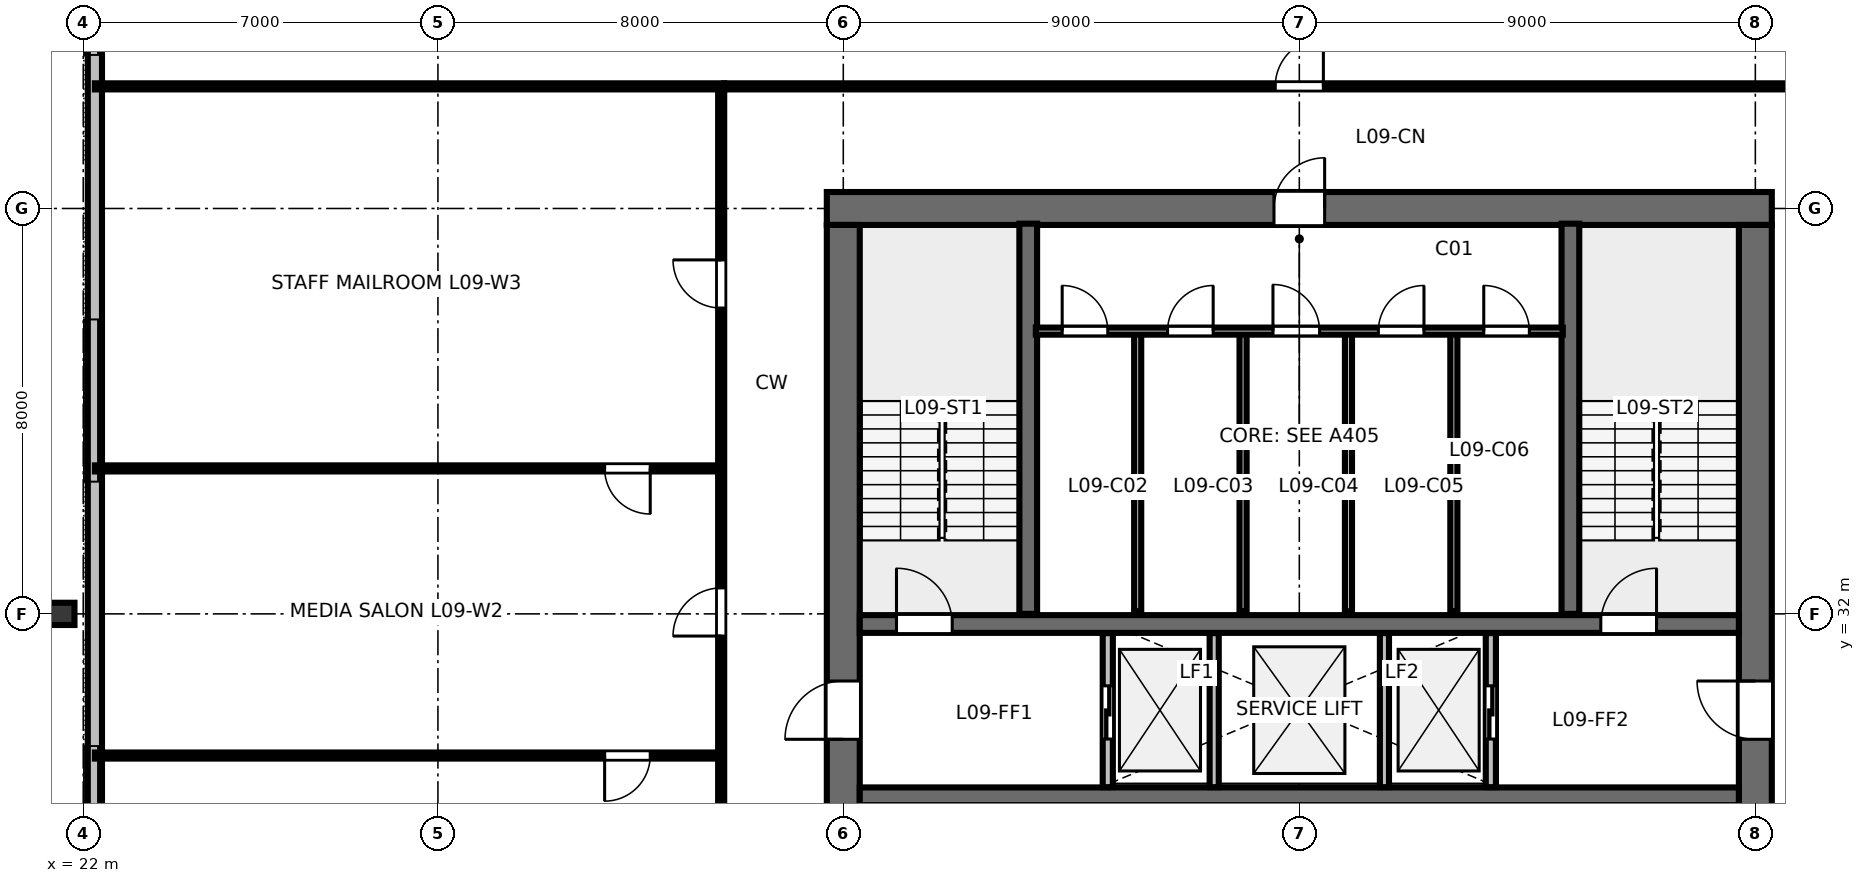
"""IFC4 building model, lengths in metres.
Left out: names, types, materials, properties, quantities, classifications, styles, units other than length and angle.
Written with IfcOpenShell. Run it as: python <this file> out.ifc"""

import sys

from ifc_helpers import new_model, si_unit, direction, frame, frame_2d, origin, origin_2d, place, context, subcontext, project, spatial, rectangle, i_section, extrude, element, fill, save


model = new_model("IFC4")
c1 = context("Model", 3, precision=1e-05, world=origin(), true_north=direction((0.0, 1.0)))
c2 = subcontext(c1, "Body", "Model", "MODEL_VIEW")
j1 = project(units=[si_unit("LENGTHUNIT", "METRE"), si_unit("PLANEANGLEUNIT", "RADIAN")], contexts=[c1])
p1 = place(None, origin())
s1 = spatial("IfcSite", under=j1, at=p1, CompositionType="ELEMENT")
p2 = place(p1, origin())
s2 = spatial("IfcBuilding", under=s1, at=p2, CompositionType="ELEMENT")
p3 = place(p2, frame((0.0, 0.0, 38.8)))
s3 = spatial("IfcBuildingStorey", under=s2, at=p3, CompositionType="ELEMENT", Elevation=38.8)
p4 = place(p3, frame((36.675, 40.0, 0.0), z_axis=(0.0, 0.0, 1.0), x_axis=(1.0, 0.0, 0.0)))
e1 = element("IfcWall", 1, at=p4, inside=s3, PredefinedType="SHEAR", context=c2, shape_type="SweptSolid", body=[
    extrude(rectangle(XDim=18.65, YDim=0.65, at=frame_2d((9.325, 0.0))), origin(), (0.0, 0.0, 1.0), 3.36),
])
p5 = place(p4, frame((8.825, 0.0, 0.0)))
e2 = element("IfcOpeningElement", 2, at=p5, cuts=e1, PredefinedType="OPENING", context=c2, shape_type="SweptSolid", body=[
    extrude(rectangle(XDim=1.0, YDim=2.15, at=frame_2d((0.5, 1.075))), frame((0.0, 0.335, 0.0), z_axis=(0.0, -1.0, 0.0), x_axis=(1.0, 0.0, 0.0)), (0.0, 0.0, 1.0), 0.67),
])
p6 = place(p3, frame((37.0, 24.325, 0.0), z_axis=(0.0, 0.0, 1.0), x_axis=(0.0, 1.0, 0.0)))
e3 = element("IfcWall", 3, at=p6, inside=s3, PredefinedType="SHEAR", context=c2, shape_type="SweptSolid", body=[
    extrude(rectangle(XDim=15.35, YDim=0.65, at=frame_2d((7.675, 0.0))), origin(), (0.0, 0.0, 1.0), 3.36),
])
p7 = place(p6, frame((5.2, 0.0, 0.0)))
e4 = element("IfcOpeningElement", 4, at=p7, cuts=e3, PredefinedType="OPENING", context=c2, shape_type="SweptSolid", body=[
    extrude(rectangle(XDim=1.15, YDim=2.15, at=frame_2d((0.575, 1.075))), frame((0.0, 0.335, 0.0), z_axis=(0.0, -1.0, 0.0), x_axis=(1.0, 0.0, 0.0)), (0.0, 0.0, 1.0), 0.67),
])
p8 = place(p3, frame((55.0, 24.325, 0.0), z_axis=(0.0, 0.0, 1.0), x_axis=(0.0, 1.0, 0.0)))
e5 = element("IfcWall", 5, at=p8, inside=s3, PredefinedType="SHEAR", context=c2, shape_type="SweptSolid", body=[
    extrude(rectangle(XDim=15.35, YDim=0.65, at=frame_2d((7.675, 0.0))), origin(), (0.0, 0.0, 1.0), 3.36),
])
p9 = place(p8, frame((5.2, 0.0, 0.0)))
e6 = element("IfcOpeningElement", 6, at=p9, cuts=e5, PredefinedType="OPENING", context=c2, shape_type="SweptSolid", body=[
    extrude(rectangle(XDim=1.15, YDim=2.15, at=frame_2d((0.575, 1.075))), frame((0.0, 0.335, 0.0), z_axis=(0.0, -1.0, 0.0), x_axis=(1.0, 0.0, 0.0)), (0.0, 0.0, 1.0), 0.67),
])
p10 = place(p3, frame((37.325, 31.8, 0.0), z_axis=(0.0, 0.0, 1.0), x_axis=(1.0, 0.0, 0.0)))
e7 = element("IfcWall", 7, at=p10, inside=s3, PredefinedType="SHEAR", context=c2, shape_type="SweptSolid", body=[
    extrude(rectangle(XDim=17.35, YDim=0.35, at=frame_2d((8.675, 0.0))), origin(), (0.0, 0.0, 1.0), 3.36),
])
p11 = place(p10, frame((0.725, 0.0, 0.0)))
e8 = element("IfcOpeningElement", 8, at=p11, cuts=e7, PredefinedType="OPENING", context=c2, shape_type="SweptSolid", body=[
    extrude(rectangle(XDim=1.1, YDim=2.15, at=frame_2d((0.55, 1.075))), frame((0.0, 0.185, 0.0), z_axis=(0.0, -1.0, 0.0), x_axis=(1.0, 0.0, 0.0)), (0.0, 0.0, 1.0), 0.37),
])
p12 = place(p10, frame((14.625, 0.0, 0.0)))
e9 = element("IfcOpeningElement", 9, at=p12, cuts=e7, PredefinedType="OPENING", context=c2, shape_type="SweptSolid", body=[
    extrude(rectangle(XDim=1.1, YDim=2.15, at=frame_2d((0.55, 1.075))), frame((0.0, 0.185, 0.0), z_axis=(0.0, -1.0, 0.0), x_axis=(1.0, 0.0, 0.0)), (0.0, 0.0, 1.0), 0.37),
])
p13 = place(p3, frame((37.325, 28.4, 0.0), z_axis=(0.0, 0.0, 1.0), x_axis=(1.0, 0.0, 0.0)))
e10 = element("IfcWall", 10, at=p13, inside=s3, PredefinedType="SHEAR", context=c2, shape_type="SweptSolid", body=[
    extrude(rectangle(XDim=17.35, YDim=0.35, at=frame_2d((8.675, 0.0))), origin(), (0.0, 0.0, 1.0), 3.36),
])
p14 = place(p3, frame((21.57, 32.0, 0.0), z_axis=(0.0, 0.0, 1.0), x_axis=(0.0, 1.0, 0.0)))
e11 = element("IfcColumn", 11, at=p14, inside=s3, PredefinedType="COLUMN", context=c2, shape_type="SweptSolid", body=[
    extrude(i_section(OverallWidth=0.439, OverallDepth=0.514, WebThickness=0.06, FlangeThickness=0.097, FilletRadius=0.025, at=origin_2d()), origin(), (0.0, 0.0, 1.0), 3.358),
])
p15 = place(p3, frame((22.23, 49.74, 0.0), z_axis=(0.0, 0.0, 1.0), x_axis=(0.0, -1.0, 0.0)))
e12 = element("IfcWall", 12, at=p15, inside=s3, PredefinedType="STANDARD", context=c2, shape_type="SweptSolid", body=[
    extrude(rectangle(XDim=35.48, YDim=0.28, at=frame_2d((17.74, 0.0))), origin(), (0.0, 0.0, 1.0), 3.36),
])
for number, where, z_axis, x_axis in (
    (13, (40.65, 32.0, 0.0), (0.0, 0.0, 1.0), (0.0, 1.0, 0.0)),
    (14, (51.35, 32.0, 0.0), (0.0, 0.0, 1.0), (0.0, 1.0, 0.0)),
):
    element("IfcWall", number, at=place(p3, frame(where, z_axis=z_axis, x_axis=x_axis)), inside=s3, PredefinedType="SHEAR", context=c2, shape_type="SweptSolid", body=[
        extrude(rectangle(XDim=7.7, YDim=0.35, at=frame_2d((3.85, 0.0))), origin(), (0.0, 0.0, 1.0), 3.6),
    ])
for number, where, z_axis, x_axis in (
    (15, (42.81, 32.05, 0.0), (0.0, 0.0, 1.0), (0.0, 1.0, 0.0)),
    (16, (44.89, 32.05, 0.0), (0.0, 0.0, 1.0), (0.0, 1.0, 0.0)),
    (17, (46.97, 32.05, 0.0), (0.0, 0.0, 1.0), (0.0, 1.0, 0.0)),
    (18, (49.05, 32.05, 0.0), (0.0, 0.0, 1.0), (0.0, 1.0, 0.0)),
):
    element("IfcWall", number, at=place(p3, frame(where, z_axis=z_axis, x_axis=x_axis)), inside=s3, PredefinedType="PARTITIONING", context=c2, shape_type="SweptSolid", body=[
        extrude(rectangle(XDim=5.5, YDim=0.14, at=frame_2d((2.75, 0.0))), origin(), (0.0, 0.0, 1.0), 3.36),
    ])
p16 = place(p3, frame((40.8, 37.58, 0.0), z_axis=(0.0, 0.0, 1.0), x_axis=(1.0, 0.0, 0.0)))
e19 = element("IfcWall", 19, at=p16, inside=s3, PredefinedType="PARTITIONING", context=c2, shape_type="SweptSolid", body=[
    extrude(rectangle(XDim=10.4, YDim=0.14, at=frame_2d((5.2, 0.0))), origin(), (0.0, 0.0, 1.0), 3.36),
])
p17 = place(p16, frame((0.52, 0.0, 0.0)))
e20 = element("IfcOpeningElement", 20, at=p17, cuts=e19, PredefinedType="OPENING", context=c2, shape_type="SweptSolid", body=[
    extrude(rectangle(XDim=0.9, YDim=2.15, at=frame_2d((0.45, 1.075))), frame((0.0, 0.08, 0.0), z_axis=(0.0, -1.0, 0.0), x_axis=(1.0, 0.0, 0.0)), (0.0, 0.0, 1.0), 0.16),
])
p18 = place(p16, frame((2.6, 0.0, 0.0)))
e21 = element("IfcOpeningElement", 21, at=p18, cuts=e19, PredefinedType="OPENING", context=c2, shape_type="SweptSolid", body=[
    extrude(rectangle(XDim=0.9, YDim=2.15, at=frame_2d((0.45, 1.075))), frame((0.0, 0.08, 0.0), z_axis=(0.0, -1.0, 0.0), x_axis=(1.0, 0.0, 0.0)), (0.0, 0.0, 1.0), 0.16),
])
p19 = place(p16, frame((4.68, 0.0, 0.0)))
e22 = element("IfcOpeningElement", 22, at=p19, cuts=e19, PredefinedType="OPENING", context=c2, shape_type="SweptSolid", body=[
    extrude(rectangle(XDim=0.92, YDim=2.15, at=frame_2d((0.46, 1.075))), frame((0.0, 0.08, 0.0), z_axis=(0.0, -1.0, 0.0), x_axis=(1.0, 0.0, 0.0)), (0.0, 0.0, 1.0), 0.16),
])
p20 = place(p16, frame((6.76, 0.0, 0.0)))
e23 = element("IfcOpeningElement", 23, at=p20, cuts=e19, PredefinedType="OPENING", context=c2, shape_type="SweptSolid", body=[
    extrude(rectangle(XDim=0.9, YDim=2.15, at=frame_2d((0.45, 1.075))), frame((0.0, 0.08, 0.0), z_axis=(0.0, -1.0, 0.0), x_axis=(1.0, 0.0, 0.0)), (0.0, 0.0, 1.0), 0.16),
])
p21 = place(p16, frame((8.84, 0.0, 0.0)))
e24 = element("IfcOpeningElement", 24, at=p21, cuts=e19, PredefinedType="OPENING", context=c2, shape_type="SweptSolid", body=[
    extrude(rectangle(XDim=0.9, YDim=2.15, at=frame_2d((0.45, 1.075))), frame((0.0, 0.08, 0.0), z_axis=(0.0, -1.0, 0.0), x_axis=(1.0, 0.0, 0.0)), (0.0, 0.0, 1.0), 0.16),
])
p22 = place(p3, frame((42.22, 28.58, 0.0), z_axis=(0.0, 0.0, 1.0), x_axis=(0.0, 1.0, 0.0)))
e25 = element("IfcWall", 25, at=p22, inside=s3, PredefinedType="PARTITIONING", context=c2, shape_type="SweptSolid", body=[
    extrude(rectangle(XDim=3.04, YDim=0.2, at=frame_2d((1.52, 0.0))), origin(), (0.0, 0.0, 1.0), 3.36),
])
p23 = place(p22, frame((0.95, 0.0, 0.0)))
e26 = element("IfcOpeningElement", 26, at=p23, cuts=e25, PredefinedType="OPENING", context=c2, shape_type="SweptSolid", body=[
    extrude(rectangle(XDim=1.05, YDim=2.15, at=frame_2d((0.525, 1.075))), frame((0.0, 0.11, 0.0), z_axis=(0.0, -1.0, 0.0), x_axis=(1.0, 0.0, 0.0)), (0.0, 0.0, 1.0), 0.22),
])
p24 = place(p3, frame((49.78, 28.58, 0.0), z_axis=(0.0, 0.0, 1.0), x_axis=(0.0, 1.0, 0.0)))
e27 = element("IfcWall", 27, at=p24, inside=s3, PredefinedType="PARTITIONING", context=c2, shape_type="SweptSolid", body=[
    extrude(rectangle(XDim=3.04, YDim=0.2, at=frame_2d((1.52, 0.0))), origin(), (0.0, 0.0, 1.0), 3.36),
])
p25 = place(p24, frame((0.95, 0.0, 0.0)))
e28 = element("IfcOpeningElement", 28, at=p25, cuts=e27, PredefinedType="OPENING", context=c2, shape_type="SweptSolid", body=[
    extrude(rectangle(XDim=1.05, YDim=2.15, at=frame_2d((0.525, 1.075))), frame((0.0, 0.11, 0.0), z_axis=(0.0, -1.0, 0.0), x_axis=(1.0, 0.0, 0.0)), (0.0, 0.0, 1.0), 0.22),
])
for number, where, z_axis, x_axis in (
    (29, (44.32, 28.58, 0.0), (0.0, 0.0, 1.0), (0.0, 1.0, 0.0)),
    (30, (47.68, 28.58, 0.0), (0.0, 0.0, 1.0), (0.0, 1.0, 0.0)),
):
    element("IfcWall", number, at=place(p3, frame(where, z_axis=z_axis, x_axis=x_axis)), inside=s3, PredefinedType="PARTITIONING", context=c2, shape_type="SweptSolid", body=[
        extrude(rectangle(XDim=3.04, YDim=0.18, at=frame_2d((1.52, 0.0))), origin(), (0.0, 0.0, 1.0), 3.36),
    ])
p26 = place(p3, frame((34.65, 42.41, 0.0), z_axis=(0.0, 0.0, 1.0), x_axis=(1.0, 0.0, 0.0)))
e31 = element("IfcWall", 31, at=p26, inside=s3, PredefinedType="PARTITIONING", context=c2, shape_type="SweptSolid", body=[
    extrude(rectangle(XDim=22.7, YDim=0.12, at=frame_2d((11.35, 0.0))), origin(), (0.0, 0.0, 1.0), 2.64),
])
p27 = place(p26, frame((10.875, 0.0, 0.0)))
e32 = element("IfcOpeningElement", 32, at=p27, cuts=e31, PredefinedType="OPENING", context=c2, shape_type="SweptSolid", body=[
    extrude(rectangle(XDim=0.95, YDim=2.15, at=frame_2d((0.475, 1.075))), frame((0.0, 0.07, 0.0), z_axis=(0.0, -1.0, 0.0), x_axis=(1.0, 0.0, 0.0)), (0.0, 0.0, 1.0), 0.14),
])
p28 = place(p3, frame((34.59, 29.204, 0.0), z_axis=(0.0, 0.0, 1.0), x_axis=(-1.0, 0.0, 0.0)))
e33 = element("IfcWall", 33, at=p28, inside=s3, PredefinedType="PARTITIONING", context=c2, shape_type="SweptSolid", body=[
    extrude(rectangle(XDim=12.36, YDim=0.12, at=frame_2d((6.18, 0.0))), origin(), (0.0, 0.0, 1.0), 2.64),
])
p29 = place(p28, frame((1.4, 0.0, 0.0)))
e34 = element("IfcOpeningElement", 34, at=p29, cuts=e33, PredefinedType="OPENING", context=c2, shape_type="SweptSolid", body=[
    extrude(rectangle(XDim=0.9, YDim=2.15, at=frame_2d((0.45, 1.075))), frame((0.0, 0.07, 0.0), z_axis=(0.0, -1.0, 0.0), x_axis=(1.0, 0.0, 0.0)), (0.0, 0.0, 1.0), 0.14),
])
p30 = place(p3, frame((34.59, 34.871, 0.0), z_axis=(0.0, 0.0, 1.0), x_axis=(-1.0, 0.0, 0.0)))
e35 = element("IfcWall", 35, at=p30, inside=s3, PredefinedType="PARTITIONING", context=c2, shape_type="SweptSolid", body=[
    extrude(rectangle(XDim=12.36, YDim=0.12, at=frame_2d((6.18, 0.0))), origin(), (0.0, 0.0, 1.0), 2.64),
])
p31 = place(p30, frame((1.4, 0.0, 0.0)))
e36 = element("IfcOpeningElement", 36, at=p31, cuts=e35, PredefinedType="OPENING", context=c2, shape_type="SweptSolid", body=[
    extrude(rectangle(XDim=0.9, YDim=2.15, at=frame_2d((0.45, 1.075))), frame((0.0, 0.07, 0.0), z_axis=(0.0, -1.0, 0.0), x_axis=(1.0, 0.0, 0.0)), (0.0, 0.0, 1.0), 0.14),
])
p32 = place(p3, frame((34.59, 21.65, 0.0), z_axis=(0.0, 0.0, 1.0), x_axis=(0.0, 1.0, 0.0)))
e37 = element("IfcWall", 37, at=p32, inside=s3, PredefinedType="PARTITIONING", context=c2, shape_type="SweptSolid", body=[
    extrude(rectangle(XDim=20.7, YDim=0.12, at=frame_2d((10.35, 0.0))), origin(), (0.0, 0.0, 1.0), 2.64),
])
p33 = place(p32, frame((3.402, 0.0, 0.0)))
e38 = element("IfcOpeningElement", 38, at=p33, cuts=e37, PredefinedType="OPENING", context=c2, shape_type="SweptSolid", body=[
    extrude(rectangle(XDim=0.95, YDim=2.15, at=frame_2d((0.475, 1.075))), frame((0.0, 0.07, 0.0), z_axis=(0.0, -1.0, 0.0), x_axis=(1.0, 0.0, 0.0)), (0.0, 0.0, 1.0), 0.14),
])
p34 = place(p32, frame((9.912, 0.0, 0.0)))
e39 = element("IfcOpeningElement", 39, at=p34, cuts=e37, PredefinedType="OPENING", context=c2, shape_type="SweptSolid", body=[
    extrude(rectangle(XDim=0.95, YDim=2.15, at=frame_2d((0.475, 1.075))), frame((0.0, 0.07, 0.0), z_axis=(0.0, -1.0, 0.0), x_axis=(1.0, 0.0, 0.0)), (0.0, 0.0, 1.0), 0.14),
])
p35 = place(p32, frame((16.385, 0.0, 0.0)))
e40 = element("IfcOpeningElement", 40, at=p35, cuts=e37, PredefinedType="OPENING", context=c2, shape_type="SweptSolid", body=[
    extrude(rectangle(XDim=0.95, YDim=2.15, at=frame_2d((0.475, 1.075))), frame((0.0, 0.07, 0.0), z_axis=(0.0, -1.0, 0.0), x_axis=(1.0, 0.0, 0.0)), (0.0, 0.0, 1.0), 0.14),
])
p36 = place(p3, frame((34.65, 42.41, 0.0), z_axis=(0.0, 0.0, 1.0), x_axis=(-1.0, 0.0, 0.0)))
e41 = element("IfcWall", 41, at=p36, inside=s3, PredefinedType="PARTITIONING", context=c2, shape_type="SweptSolid", body=[
    extrude(rectangle(XDim=12.42, YDim=0.12, at=frame_2d((6.21, 0.0))), origin(), (0.0, 0.0, 1.0), 2.64),
])
p37 = place(p11, origin())
e42 = element("IfcDoor", 42, at=p37, inside=s3, OperationType="SINGLE_SWING_LEFT", PredefinedType="DOOR", context=c2, shape_type="SweptSolid", body=[
    extrude(rectangle(XDim=1.1, YDim=2.15, at=frame_2d((0.55, 1.075))), frame((0.0, 0.025, 0.0), z_axis=(0.0, -1.0, 0.0), x_axis=(1.0, 0.0, 0.0)), (0.0, 0.0, 1.0), 0.05),
])
fill(e8, e42)
p38 = place(p12, origin())
e43 = element("IfcDoor", 43, at=p38, inside=s3, OperationType="SINGLE_SWING_RIGHT", PredefinedType="DOOR", context=c2, shape_type="SweptSolid", body=[
    extrude(rectangle(XDim=1.1, YDim=2.15, at=frame_2d((0.55, 1.075))), frame((0.0, 0.025, 0.0), z_axis=(0.0, -1.0, 0.0), x_axis=(1.0, 0.0, 0.0)), (0.0, 0.0, 1.0), 0.05),
])
fill(e9, e43)
p39 = place(p5, origin())
e44 = element("IfcDoor", 44, at=p39, inside=s3, OperationType="SINGLE_SWING_RIGHT", PredefinedType="DOOR", context=c2, shape_type="SweptSolid", body=[
    extrude(rectangle(XDim=1.0, YDim=2.15, at=frame_2d((0.5, 1.075))), frame((0.0, 0.025, 0.0), z_axis=(0.0, -1.0, 0.0), x_axis=(1.0, 0.0, 0.0)), (0.0, 0.0, 1.0), 0.05),
])
fill(e2, e44)
p40 = place(p7, origin())
e45 = element("IfcDoor", 45, at=p40, inside=s3, OperationType="SINGLE_SWING_LEFT", PredefinedType="DOOR", context=c2, shape_type="SweptSolid", body=[
    extrude(rectangle(XDim=1.15, YDim=2.15, at=frame_2d((0.575, 1.075))), frame((0.0, 0.025, 0.0), z_axis=(0.0, -1.0, 0.0), x_axis=(1.0, 0.0, 0.0)), (0.0, 0.0, 1.0), 0.05),
])
fill(e4, e45)
p41 = place(p9, origin())
e46 = element("IfcDoor", 46, at=p41, inside=s3, OperationType="SINGLE_SWING_RIGHT", PredefinedType="DOOR", context=c2, shape_type="SweptSolid", body=[
    extrude(rectangle(XDim=1.15, YDim=2.15, at=frame_2d((0.575, 1.075))), frame((0.0, 0.025, 0.0), z_axis=(0.0, -1.0, 0.0), x_axis=(1.0, 0.0, 0.0)), (0.0, 0.0, 1.0), 0.05),
])
fill(e6, e46)
p42 = place(p17, origin())
e47 = element("IfcDoor", 47, at=p42, inside=s3, OperationType="SINGLE_SWING_LEFT", PredefinedType="DOOR", context=c2, shape_type="SweptSolid", body=[
    extrude(rectangle(XDim=0.9, YDim=2.15, at=frame_2d((0.45, 1.075))), frame((0.0, 0.025, 0.0), z_axis=(0.0, -1.0, 0.0), x_axis=(1.0, 0.0, 0.0)), (0.0, 0.0, 1.0), 0.05),
])
fill(e20, e47)
p43 = place(p18, origin())
e48 = element("IfcDoor", 48, at=p43, inside=s3, OperationType="SINGLE_SWING_RIGHT", PredefinedType="DOOR", context=c2, shape_type="SweptSolid", body=[
    extrude(rectangle(XDim=0.9, YDim=2.15, at=frame_2d((0.45, 1.075))), frame((0.0, 0.025, 0.0), z_axis=(0.0, -1.0, 0.0), x_axis=(1.0, 0.0, 0.0)), (0.0, 0.0, 1.0), 0.05),
])
fill(e21, e48)
p44 = place(p19, origin())
e49 = element("IfcDoor", 49, at=p44, inside=s3, OperationType="SINGLE_SWING_LEFT", PredefinedType="DOOR", context=c2, shape_type="SweptSolid", body=[
    extrude(rectangle(XDim=0.92, YDim=2.15, at=frame_2d((0.46, 1.075))), frame((0.0, 0.025, 0.0), z_axis=(0.0, -1.0, 0.0), x_axis=(1.0, 0.0, 0.0)), (0.0, 0.0, 1.0), 0.05),
])
fill(e22, e49)
p45 = place(p20, origin())
e50 = element("IfcDoor", 50, at=p45, inside=s3, OperationType="SINGLE_SWING_RIGHT", PredefinedType="DOOR", context=c2, shape_type="SweptSolid", body=[
    extrude(rectangle(XDim=0.9, YDim=2.15, at=frame_2d((0.45, 1.075))), frame((0.0, 0.025, 0.0), z_axis=(0.0, -1.0, 0.0), x_axis=(1.0, 0.0, 0.0)), (0.0, 0.0, 1.0), 0.05),
])
fill(e23, e50)
p46 = place(p21, origin())
e51 = element("IfcDoor", 51, at=p46, inside=s3, OperationType="SINGLE_SWING_LEFT", PredefinedType="DOOR", context=c2, shape_type="SweptSolid", body=[
    extrude(rectangle(XDim=0.9, YDim=2.15, at=frame_2d((0.45, 1.075))), frame((0.0, 0.025, 0.0), z_axis=(0.0, -1.0, 0.0), x_axis=(1.0, 0.0, 0.0)), (0.0, 0.0, 1.0), 0.05),
])
fill(e24, e51)
p47 = place(p23, origin())
e52 = element("IfcDoor", 52, at=p47, inside=s3, OperationType="SLIDING_TO_LEFT", PredefinedType="DOOR", context=c2, shape_type="SweptSolid", body=[
    extrude(rectangle(XDim=1.05, YDim=2.15, at=frame_2d((0.525, 1.075))), frame((0.0, 0.025, 0.0), z_axis=(0.0, -1.0, 0.0), x_axis=(1.0, 0.0, 0.0)), (0.0, 0.0, 1.0), 0.05),
])
fill(e26, e52)
p48 = place(p25, origin())
e53 = element("IfcDoor", 53, at=p48, inside=s3, OperationType="SLIDING_TO_RIGHT", PredefinedType="DOOR", context=c2, shape_type="SweptSolid", body=[
    extrude(rectangle(XDim=1.05, YDim=2.15, at=frame_2d((0.525, 1.075))), frame((0.0, 0.025, 0.0), z_axis=(0.0, -1.0, 0.0), x_axis=(1.0, 0.0, 0.0)), (0.0, 0.0, 1.0), 0.05),
])
fill(e28, e53)
p49 = place(p27, origin())
e54 = element("IfcDoor", 54, at=p49, inside=s3, OperationType="SINGLE_SWING_RIGHT", PredefinedType="DOOR", context=c2, shape_type="SweptSolid", body=[
    extrude(rectangle(XDim=0.95, YDim=2.15, at=frame_2d((0.475, 1.075))), frame((0.0, 0.025, 0.0), z_axis=(0.0, -1.0, 0.0), x_axis=(1.0, 0.0, 0.0)), (0.0, 0.0, 1.0), 0.05),
])
fill(e32, e54)
p50 = place(p29, origin())
e55 = element("IfcDoor", 55, at=p50, inside=s3, OperationType="SINGLE_SWING_RIGHT", PredefinedType="DOOR", context=c2, shape_type="SweptSolid", body=[
    extrude(rectangle(XDim=0.9, YDim=2.15, at=frame_2d((0.45, 1.075))), frame((0.0, 0.025, 0.0), z_axis=(0.0, -1.0, 0.0), x_axis=(1.0, 0.0, 0.0)), (0.0, 0.0, 1.0), 0.05),
])
fill(e34, e55)
p51 = place(p31, origin())
e56 = element("IfcDoor", 56, at=p51, inside=s3, OperationType="SINGLE_SWING_LEFT", PredefinedType="DOOR", context=c2, shape_type="SweptSolid", body=[
    extrude(rectangle(XDim=0.9, YDim=2.15, at=frame_2d((0.45, 1.075))), frame((0.0, 0.025, 0.0), z_axis=(0.0, -1.0, 0.0), x_axis=(1.0, 0.0, 0.0)), (0.0, 0.0, 1.0), 0.05),
])
fill(e36, e56)
p52 = place(p34, origin())
e57 = element("IfcDoor", 57, at=p52, inside=s3, OperationType="SINGLE_SWING_LEFT", PredefinedType="DOOR", context=c2, shape_type="SweptSolid", body=[
    extrude(rectangle(XDim=0.95, YDim=2.15, at=frame_2d((0.475, 1.075))), frame((0.0, 0.025, 0.0), z_axis=(0.0, -1.0, 0.0), x_axis=(1.0, 0.0, 0.0)), (0.0, 0.0, 1.0), 0.05),
])
fill(e39, e57)
p53 = place(p35, origin())
e58 = element("IfcDoor", 58, at=p53, inside=s3, OperationType="SINGLE_SWING_RIGHT", PredefinedType="DOOR", context=c2, shape_type="SweptSolid", body=[
    extrude(rectangle(XDim=0.95, YDim=2.15, at=frame_2d((0.475, 1.075))), frame((0.0, 0.025, 0.0), z_axis=(0.0, -1.0, 0.0), x_axis=(1.0, 0.0, 0.0)), (0.0, 0.0, 1.0), 0.05),
])
fill(e40, e58)
save(model, sys.argv[1])
